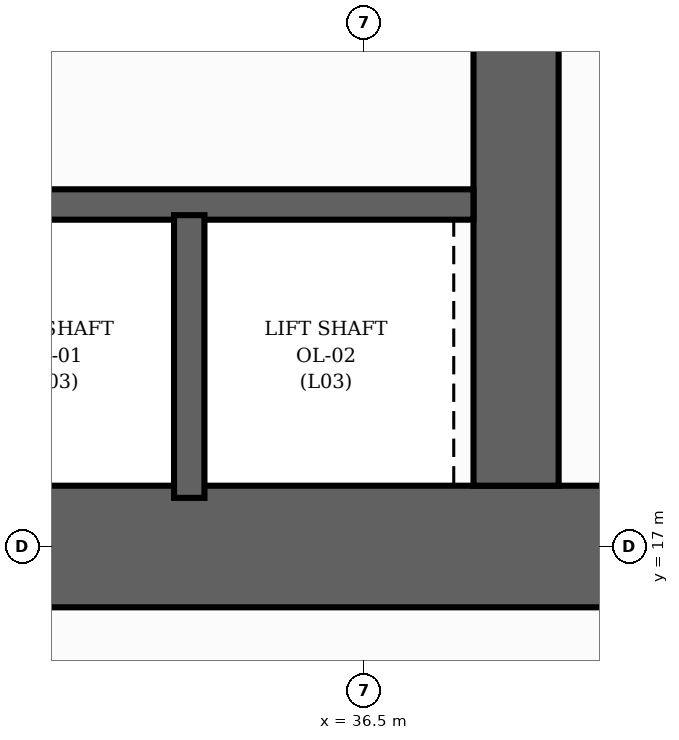
"""IFC4 building model, lengths in metres.
Left out: names, types, materials, properties, quantities, classifications, styles, units other than length and angle.
Written with IfcOpenShell. Run it as: python <this file> out.ifc"""

import sys

from ifc_helpers import new_model, si_unit, direction, frame, frame_2d, origin, place, context, subcontext, project, spatial, rectangle, extrude, element, save


model = new_model("IFC4")
c1 = context("Model", 3, precision=1e-05, world=origin(), true_north=direction((0.0, 1.0)))
c2 = subcontext(c1, "Body", "Model", "MODEL_VIEW")
j1 = project(units=[si_unit("LENGTHUNIT", "METRE"), si_unit("PLANEANGLEUNIT", "RADIAN")], contexts=[c1])
p1 = place(None, origin())
s1 = spatial("IfcSite", under=j1, at=p1, CompositionType="ELEMENT")
p2 = place(p1, origin())
s2 = spatial("IfcBuilding", under=s1, at=p2, CompositionType="ELEMENT")
p3 = place(p2, frame((0.0, 0.0, 8.0)))
s3 = spatial("IfcBuildingStorey", under=s2, at=p3, CompositionType="ELEMENT", Elevation=8.0)
p4 = place(p3, frame((22.6, 17.0, 0.0), z_axis=(0.0, 0.0, 1.0), x_axis=(1.0, 0.0, 0.0)))
e1 = element("IfcWall", 1, at=p4, inside=s3, PredefinedType="SHEAR", context=c2, shape_type="SweptSolid", body=[
    extrude(rectangle(XDim=18.8, YDim=0.8, at=frame_2d((9.4, 0.0))), origin(), (0.0, 0.0, 1.0), 4.0),
])
p5 = place(p4, frame((5.9, 0.0, 0.0)))
e2 = element("IfcOpeningElement", 2, at=p5, cuts=e1, PredefinedType="OPENING", context=c2, shape_type="SweptSolid", body=[
    extrude(rectangle(XDim=1.1, YDim=2.15, at=frame_2d((0.55, 1.075))), frame((0.0, 0.41, 0.0), z_axis=(0.0, -1.0, 0.0), x_axis=(1.0, 0.0, 0.0)), (0.0, 0.0, 1.0), 0.82),
])
p6 = place(p4, frame((9.45, 0.0, 0.0)))
e3 = element("IfcOpeningElement", 3, at=p6, cuts=e1, PredefinedType="OPENING", context=c2, shape_type="SweptSolid", body=[
    extrude(rectangle(XDim=0.9, YDim=2.1, at=frame_2d((0.45, 1.05))), frame((0.0, 0.41, 0.0), z_axis=(0.0, -1.0, 0.0), x_axis=(1.0, 0.0, 0.0)), (0.0, 0.0, 1.0), 0.82),
])
p7 = place(p3, frame((37.5, 17.4, 0.0), z_axis=(0.0, 0.0, 1.0), x_axis=(0.0, 1.0, 0.0)))
e4 = element("IfcWall", 4, at=p7, inside=s3, PredefinedType="SHEAR", context=c2, shape_type="SweptSolid", body=[
    extrude(rectangle(XDim=13.2, YDim=0.56, at=frame_2d((6.6, 0.0))), origin(), (0.0, 0.0, 1.0), 4.0),
])
p8 = place(p3, frame((33.5, 19.25, 0.0), z_axis=(0.0, 0.0, 1.0), x_axis=(1.0, 0.0, 0.0)))
e5 = element("IfcWall", 5, at=p8, inside=s3, PredefinedType="SHEAR", context=c2, shape_type="SweptSolid", body=[
    extrude(rectangle(XDim=3.72, YDim=0.2, at=frame_2d((1.86, 0.0))), origin(), (0.0, 0.0, 1.0), 4.0),
])
p9 = place(p3, frame((35.35, 17.32, 0.0), z_axis=(0.0, 0.0, 1.0), x_axis=(0.0, 1.0, 0.0)))
e6 = element("IfcWall", 6, at=p9, inside=s3, PredefinedType="SHEAR", context=c2, shape_type="SweptSolid", body=[
    extrude(rectangle(XDim=1.86, YDim=0.2, at=frame_2d((0.93, 0.0))), origin(), (0.0, 0.0, 1.0), 4.0),
])
save(model, sys.argv[1])
